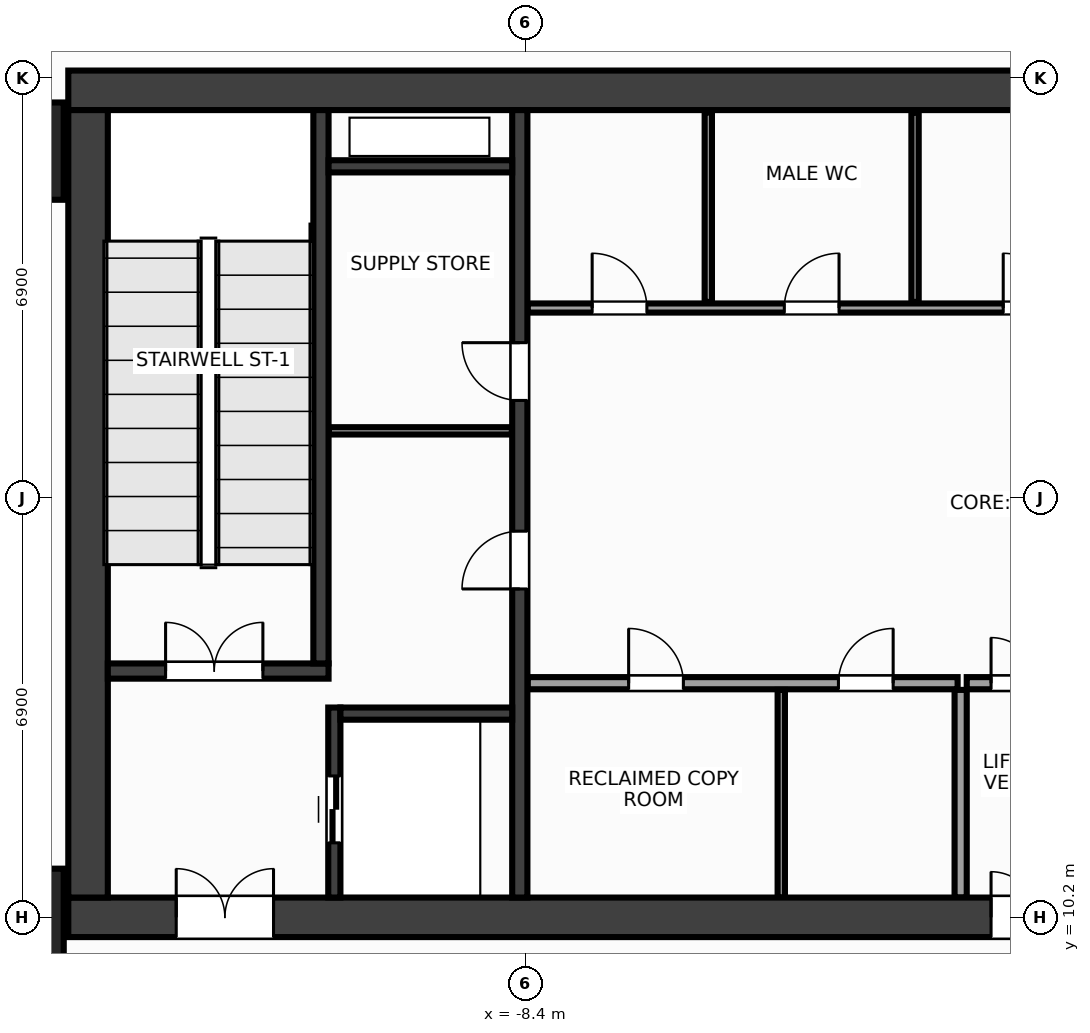
"""IFC4 building model, lengths in metres.
Left out: names, types, materials, properties, quantities, classifications, styles, units other than length and angle.
Written with IfcOpenShell. Run it as: python <this file> out.ifc"""

import sys

from ifc_helpers import new_model, si_unit, direction, frame, frame_2d, origin, origin_2d, place, context, subcontext, project, spatial, rectangle, extrude, source, transform, mapped, element, fill, save


model = new_model("IFC4")
c1 = context("Model", 3, precision=1e-05, world=origin(), true_north=direction((0.0, 1.0)))
c2 = subcontext(c1, "Body", "Model", "MODEL_VIEW")
j1 = project(units=[si_unit("LENGTHUNIT", "METRE"), si_unit("PLANEANGLEUNIT", "RADIAN")], contexts=[c1])
p1 = place(None, origin())
s1 = spatial("IfcSite", under=j1, at=p1, CompositionType="ELEMENT")
p2 = place(p1, origin())
s2 = spatial("IfcBuilding", under=s1, at=p2, CompositionType="ELEMENT")
p3 = place(p2, frame((0.0, 0.0, 124.4)))
s3 = spatial("IfcBuildingStorey", under=s2, at=p3, CompositionType="ELEMENT", Elevation=124.4)
m1 = source(origin(), c2, "Body", "SweptSolid", [
    extrude(rectangle(XDim=31.85, YDim=0.65, at=frame_2d((15.925, 0.0))), origin(), (0.0, 0.0, 1.0), 7.2),
])
p4 = place(p3, frame((-15.925, 23.8, 0.0), z_axis=(0.0, 0.0, 1.0), x_axis=(1.0, 0.0, 0.0)))
e1 = element("IfcWall", 1, at=p4, inside=s3, PredefinedType="SHEAR", context=c2, shape_type="MappedRepresentation", body=[
    mapped(m1, transform((0.0, 0.0, 0.0), x_axis=(1.0, 0.0, 0.0), y_axis=(0.0, 1.0, 0.0), z_axis=(0.0, 0.0, 1.0), scale=1.0)),
])
p5 = place(p3, frame((-15.925, 10.2, 0.0), z_axis=(0.0, 0.0, 1.0), x_axis=(1.0, 0.0, 0.0)))
e2 = element("IfcWall", 2, at=p5, inside=s3, PredefinedType="SHEAR", context=c2, shape_type="MappedRepresentation", body=[
    mapped(m1, transform((0.0, 0.0, 0.0), x_axis=(1.0, 0.0, 0.0), y_axis=(0.0, 1.0, 0.0), z_axis=(0.0, 0.0, 1.0), scale=1.0)),
])
p6 = place(p5, frame((1.775, 0.0, 0.0)))
e3 = element("IfcOpeningElement", 3, at=p6, cuts=e2, PredefinedType="OPENING", context=c2, shape_type="SweptSolid", body=[
    extrude(rectangle(XDim=1.6, YDim=2.15, at=frame_2d((0.8, 1.075))), frame((0.0, 0.337, 0.0), z_axis=(0.0, -1.0, 0.0), x_axis=(1.0, 0.0, 0.0)), (0.0, 0.0, 1.0), 0.674),
])
p7 = place(p5, frame((28.475, 0.0, 0.0)))
e4 = element("IfcOpeningElement", 4, at=p7, cuts=e2, PredefinedType="OPENING", context=c2, shape_type="SweptSolid", body=[
    extrude(rectangle(XDim=1.6, YDim=2.15, at=frame_2d((0.8, 1.075))), frame((0.0, 0.337, 0.0), z_axis=(0.0, -1.0, 0.0), x_axis=(1.0, 0.0, 0.0)), (0.0, 0.0, 1.0), 0.674),
])
p8 = place(p5, frame((15.175, 0.0, 0.0)))
e5 = element("IfcOpeningElement", 5, at=p8, cuts=e2, PredefinedType="OPENING", context=c2, shape_type="SweptSolid", body=[
    extrude(rectangle(XDim=1.5, YDim=2.2, at=frame_2d((0.75, 1.1))), frame((0.0, 0.337, 0.0), z_axis=(0.0, -1.0, 0.0), x_axis=(1.0, 0.0, 0.0)), (0.0, 0.0, 1.0), 0.674),
])
m2 = source(origin(), c2, "Body", "SweptSolid", [
    extrude(rectangle(XDim=12.95, YDim=0.65, at=frame_2d((6.475, 0.0))), origin(), (0.0, 0.0, 1.0), 7.2),
])
p9 = place(p3, frame((-15.6, 10.525, 0.0), z_axis=(0.0, 0.0, 1.0), x_axis=(0.0, 1.0, 0.0)))
e6 = element("IfcWall", 6, at=p9, inside=s3, PredefinedType="SHEAR", context=c2, shape_type="MappedRepresentation", body=[
    mapped(m2, transform((0.0, 0.0, 0.0), x_axis=(1.0, 0.0, 0.0), y_axis=(0.0, 1.0, 0.0), z_axis=(0.0, 0.0, 1.0), scale=1.0)),
])
m3 = source(origin(), c2, "Body", "SweptSolid", [
    extrude(rectangle(XDim=12.95, YDim=0.25, at=frame_2d((6.475, 0.0))), origin(), (0.0, 0.0, 1.0), 7.2),
])
p10 = place(p3, frame((-8.5, 10.525, 0.0), z_axis=(0.0, 0.0, 1.0), x_axis=(0.0, 1.0, 0.0)))
e7 = element("IfcWall", 7, at=p10, inside=s3, PredefinedType="SHEAR", context=c2, shape_type="MappedRepresentation", body=[
    mapped(m3, transform((0.0, 0.0, 0.0), x_axis=(1.0, 0.0, 0.0), y_axis=(0.0, 1.0, 0.0), z_axis=(0.0, 0.0, 1.0), scale=1.0)),
])
p11 = place(p10, frame((5.075, 0.0, 0.0)))
e8 = element("IfcOpeningElement", 8, at=p11, cuts=e7, PredefinedType="OPENING", context=c2, shape_type="SweptSolid", body=[
    extrude(rectangle(XDim=0.95, YDim=2.15, at=frame_2d((0.475, 1.075))), frame((0.0, 0.137, 0.0), z_axis=(0.0, -1.0, 0.0), x_axis=(1.0, 0.0, 0.0)), (0.0, 0.0, 1.0), 0.274),
])
p12 = place(p10, frame((8.175, 0.0, 0.0)))
e9 = element("IfcOpeningElement", 9, at=p12, cuts=e7, PredefinedType="OPENING", context=c2, shape_type="SweptSolid", body=[
    extrude(rectangle(XDim=0.95, YDim=2.15, at=frame_2d((0.475, 1.075))), frame((0.0, 0.137, 0.0), z_axis=(0.0, -1.0, 0.0), x_axis=(1.0, 0.0, 0.0)), (0.0, 0.0, 1.0), 0.274),
])
m4 = source(origin(), c2, "Body", "SweptSolid", [
    extrude(rectangle(XDim=3.63, YDim=0.25, at=frame_2d((1.815, 0.0))), origin(), (0.0, 0.0, 1.0), 7.2),
])
p13 = place(p3, frame((-15.275, 14.25, 0.0), z_axis=(0.0, 0.0, 1.0), x_axis=(1.0, 0.0, 0.0)))
e10 = element("IfcWall", 10, at=p13, inside=s3, PredefinedType="SHEAR", context=c2, shape_type="MappedRepresentation", body=[
    mapped(m4, transform((0.0, 0.0, 0.0), x_axis=(1.0, 0.0, 0.0), y_axis=(0.0, 1.0, 0.0), z_axis=(0.0, 0.0, 1.0), scale=1.0)),
])
p14 = place(p13, frame((0.95, 0.0, 0.0)))
e11 = element("IfcOpeningElement", 11, at=p14, cuts=e10, PredefinedType="OPENING", context=c2, shape_type="SweptSolid", body=[
    extrude(rectangle(XDim=1.6, YDim=2.15, at=frame_2d((0.8, 1.075))), frame((0.0, 0.137, 0.0), z_axis=(0.0, -1.0, 0.0), x_axis=(1.0, 0.0, 0.0)), (0.0, 0.0, 1.0), 0.274),
])
m5 = source(origin(), c2, "Body", "SweptSolid", [
    extrude(rectangle(XDim=9.1, YDim=0.25, at=frame_2d((4.55, 0.0))), origin(), (0.0, 0.0, 1.0), 7.2),
])
p15 = place(p3, frame((-11.77, 14.375, 0.0), z_axis=(0.0, 0.0, 1.0), x_axis=(0.0, 1.0, 0.0)))
e12 = element("IfcWall", 12, at=p15, inside=s3, PredefinedType="SHEAR", context=c2, shape_type="MappedRepresentation", body=[
    mapped(m5, transform((0.0, 0.0, 0.0), x_axis=(1.0, 0.0, 0.0), y_axis=(0.0, 1.0, 0.0), z_axis=(0.0, 0.0, 1.0), scale=1.0)),
])
m6 = source(origin(), c2, "Body", "SweptSolid", [
    extrude(rectangle(XDim=3.125, YDim=0.2, at=frame_2d((1.562, 0.0))), origin(), (0.0, 0.0, 1.0), 7.2),
])
p16 = place(p3, frame((-11.55, 10.525, 0.0), z_axis=(0.0, 0.0, 1.0), x_axis=(0.0, 1.0, 0.0)))
e13 = element("IfcWall", 13, at=p16, inside=s3, PredefinedType="SHEAR", context=c2, shape_type="MappedRepresentation", body=[
    mapped(m6, transform((0.0, 0.0, 0.0), x_axis=(1.0, 0.0, 0.0), y_axis=(0.0, 1.0, 0.0), z_axis=(0.0, 0.0, 1.0), scale=1.0)),
])
p17 = place(p16, frame((0.9, 0.0, 0.0)))
e14 = element("IfcOpeningElement", 14, at=p17, cuts=e13, PredefinedType="OPENING", context=c2, shape_type="SweptSolid", body=[
    extrude(rectangle(XDim=1.1, YDim=2.15, at=frame_2d((0.55, 1.075))), frame((0.0, 0.112, 0.0), z_axis=(0.0, -1.0, 0.0), x_axis=(1.0, 0.0, 0.0)), (0.0, 0.0, 1.0), 0.224),
])
m7 = source(origin(), c2, "Body", "SweptSolid", [
    extrude(rectangle(XDim=2.825, YDim=0.2, at=frame_2d((1.413, 0.0))), origin(), (0.0, 0.0, 1.0), 7.2),
])
p18 = place(p3, frame((-11.45, 13.55, 0.0), z_axis=(0.0, 0.0, 1.0), x_axis=(1.0, 0.0, 0.0)))
e15 = element("IfcWall", 15, at=p18, inside=s3, PredefinedType="SHEAR", context=c2, shape_type="MappedRepresentation", body=[
    mapped(m7, transform((0.0, 0.0, 0.0), x_axis=(1.0, 0.0, 0.0), y_axis=(0.0, 1.0, 0.0), z_axis=(0.0, 0.0, 1.0), scale=1.0)),
])
m8 = source(origin(), c2, "Body", "SweptSolid", [
    extrude(rectangle(XDim=3.02, YDim=0.2, at=frame_2d((1.51, 0.0))), origin(), (0.0, 0.0, 1.0), 7.2),
])
p19 = place(p3, frame((-11.645, 22.55, 0.0), z_axis=(0.0, 0.0, 1.0), x_axis=(1.0, 0.0, 0.0)))
e16 = element("IfcWall", 16, at=p19, inside=s3, PredefinedType="SHEAR", context=c2, shape_type="MappedRepresentation", body=[
    mapped(m8, transform((0.0, 0.0, 0.0), x_axis=(1.0, 0.0, 0.0), y_axis=(0.0, 1.0, 0.0), z_axis=(0.0, 0.0, 1.0), scale=1.0)),
])
m9 = source(origin(), c2, "Body", "SweptSolid", [
    extrude(rectangle(XDim=1.6, YDim=1.6, at=origin_2d()), origin(), (0.0, 0.0, 1.0), 7.2),
])
for number, where, z_axis, x_axis in (
    (17, (-16.8, 10.2, 0.0), (0.0, 0.0, 1.0), (1.0, 0.0, 0.0)),
    (18, (-16.8, 22.8, 0.0), (0.0, 0.0, 1.0), (1.0, 0.0, 0.0)),
):
    element("IfcColumn", number, at=place(p3, frame(where, z_axis=z_axis, x_axis=x_axis)), inside=s3, PredefinedType="COLUMN", context=c2, shape_type="MappedRepresentation", body=[
        mapped(m9, transform((0.0, 0.0, 0.0), x_axis=(1.0, 0.0, 0.0), y_axis=(0.0, 1.0, 0.0), z_axis=(0.0, 0.0, 1.0), scale=1.0)),
    ])
m10 = source(origin(), c2, "Body", "SweptSolid", [
    extrude(rectangle(XDim=3.01, YDim=0.12, at=frame_2d((1.505, 0.0))), origin(), (0.0, 0.0, 1.0), 6.9),
])
p20 = place(p3, frame((-11.64, 18.2, 0.0), z_axis=(0.0, 0.0, 1.0), x_axis=(1.0, 0.0, 0.0)))
e19 = element("IfcWall", 19, at=p20, inside=s3, PredefinedType="PARTITIONING", context=c2, shape_type="MappedRepresentation", body=[
    mapped(m10, transform((0.0, 0.0, 0.0), x_axis=(1.0, 0.0, 0.0), y_axis=(0.0, 1.0, 0.0), z_axis=(0.0, 0.0, 1.0), scale=1.0)),
])
m11 = source(origin(), c2, "Body", "SweptSolid", [
    extrude(rectangle(XDim=7.07, YDim=0.2, at=frame_2d((3.535, 0.0))), origin(), (0.0, 0.0, 1.0), 6.9),
])
p21 = place(p3, frame((-8.37, 14.05, 0.0), z_axis=(0.0, 0.0, 1.0), x_axis=(1.0, 0.0, 0.0)))
e20 = element("IfcWall", 20, at=p21, inside=s3, PredefinedType="PARTITIONING", context=c2, shape_type="MappedRepresentation", body=[
    mapped(m11, transform((0.0, 0.0, 0.0), x_axis=(1.0, 0.0, 0.0), y_axis=(0.0, 1.0, 0.0), z_axis=(0.0, 0.0, 1.0), scale=1.0)),
])
p22 = place(p21, frame((1.66, 0.0, 0.0)))
e21 = element("IfcOpeningElement", 21, at=p22, cuts=e20, PredefinedType="OPENING", context=c2, shape_type="SweptSolid", body=[
    extrude(rectangle(XDim=0.9, YDim=2.15, at=frame_2d((0.45, 1.075))), frame((0.0, 0.112, 0.0), z_axis=(0.0, -1.0, 0.0), x_axis=(1.0, 0.0, 0.0)), (0.0, 0.0, 1.0), 0.224),
])
p23 = place(p21, frame((5.11, 0.0, 0.0)))
e22 = element("IfcOpeningElement", 22, at=p23, cuts=e20, PredefinedType="OPENING", context=c2, shape_type="SweptSolid", body=[
    extrude(rectangle(XDim=0.9, YDim=2.15, at=frame_2d((0.45, 1.075))), frame((0.0, 0.112, 0.0), z_axis=(0.0, -1.0, 0.0), x_axis=(1.0, 0.0, 0.0)), (0.0, 0.0, 1.0), 0.224),
])
m12 = source(origin(), c2, "Body", "SweptSolid", [
    extrude(rectangle(XDim=3.415, YDim=0.2, at=frame_2d((1.708, 0.0))), origin(), (0.0, 0.0, 1.0), 6.9),
])
p24 = place(p3, frame((-1.25, 10.525, 0.0), z_axis=(0.0, 0.0, 1.0), x_axis=(0.0, 1.0, 0.0)))
e23 = element("IfcWall", 23, at=p24, inside=s3, PredefinedType="PARTITIONING", context=c2, shape_type="MappedRepresentation", body=[
    mapped(m12, transform((0.0, 0.0, 0.0), x_axis=(1.0, 0.0, 0.0), y_axis=(0.0, 1.0, 0.0), z_axis=(0.0, 0.0, 1.0), scale=1.0)),
])
m13 = source(origin(), c2, "Body", "SweptSolid", [
    extrude(rectangle(XDim=2.3, YDim=0.2, at=frame_2d((1.15, 0.0))), origin(), (0.0, 0.0, 1.0), 6.9),
])
p25 = place(p3, frame((-1.15, 14.05, 0.0), z_axis=(0.0, 0.0, 1.0), x_axis=(1.0, 0.0, 0.0)))
e24 = element("IfcWall", 24, at=p25, inside=s3, PredefinedType="PARTITIONING", context=c2, shape_type="MappedRepresentation", body=[
    mapped(m13, transform((0.0, 0.0, 0.0), x_axis=(1.0, 0.0, 0.0), y_axis=(0.0, 1.0, 0.0), z_axis=(0.0, 0.0, 1.0), scale=1.0)),
])
p26 = place(p25, frame((0.4, 0.0, 0.0)))
e25 = element("IfcOpeningElement", 25, at=p26, cuts=e24, PredefinedType="OPENING", context=c2, shape_type="SweptSolid", body=[
    extrude(rectangle(XDim=1.5, YDim=2.2, at=frame_2d((0.75, 1.1))), frame((0.0, 0.112, 0.0), z_axis=(0.0, -1.0, 0.0), x_axis=(1.0, 0.0, 0.0)), (0.0, 0.0, 1.0), 0.224),
])
m14 = source(origin(), c2, "Body", "SweptSolid", [
    extrude(rectangle(XDim=14.59, YDim=0.15, at=frame_2d((7.295, 0.0))), origin(), (0.0, 0.0, 1.0), 6.9),
])
p27 = place(p3, frame((-8.37, 20.22, 0.0), z_axis=(0.0, 0.0, 1.0), x_axis=(1.0, 0.0, 0.0)))
e26 = element("IfcWall", 26, at=p27, inside=s3, PredefinedType="PARTITIONING", context=c2, shape_type="MappedRepresentation", body=[
    mapped(m14, transform((0.0, 0.0, 0.0), x_axis=(1.0, 0.0, 0.0), y_axis=(0.0, 1.0, 0.0), z_axis=(0.0, 0.0, 1.0), scale=1.0)),
])
p28 = place(p27, frame((1.06, 0.0, 0.0)))
e27 = element("IfcOpeningElement", 27, at=p28, cuts=e26, PredefinedType="OPENING", context=c2, shape_type="SweptSolid", body=[
    extrude(rectangle(XDim=0.9, YDim=2.15, at=frame_2d((0.45, 1.075))), frame((0.0, 0.087, 0.0), z_axis=(0.0, -1.0, 0.0), x_axis=(1.0, 0.0, 0.0)), (0.0, 0.0, 1.0), 0.174),
])
p29 = place(p27, frame((4.22, 0.0, 0.0)))
e28 = element("IfcOpeningElement", 28, at=p29, cuts=e26, PredefinedType="OPENING", context=c2, shape_type="SweptSolid", body=[
    extrude(rectangle(XDim=0.9, YDim=2.15, at=frame_2d((0.45, 1.075))), frame((0.0, 0.087, 0.0), z_axis=(0.0, -1.0, 0.0), x_axis=(1.0, 0.0, 0.0)), (0.0, 0.0, 1.0), 0.174),
])
p30 = place(p27, frame((7.82, 0.0, 0.0)))
e29 = element("IfcOpeningElement", 29, at=p30, cuts=e26, PredefinedType="OPENING", context=c2, shape_type="SweptSolid", body=[
    extrude(rectangle(XDim=0.9, YDim=2.15, at=frame_2d((0.45, 1.075))), frame((0.0, 0.087, 0.0), z_axis=(0.0, -1.0, 0.0), x_axis=(1.0, 0.0, 0.0)), (0.0, 0.0, 1.0), 0.174),
])
p31 = place(p27, frame((11.87, 0.0, 0.0)))
e30 = element("IfcOpeningElement", 30, at=p31, cuts=e26, PredefinedType="OPENING", context=c2, shape_type="SweptSolid", body=[
    extrude(rectangle(XDim=0.9, YDim=2.15, at=frame_2d((0.45, 1.075))), frame((0.0, 0.087, 0.0), z_axis=(0.0, -1.0, 0.0), x_axis=(1.0, 0.0, 0.0)), (0.0, 0.0, 1.0), 0.174),
])
m15 = source(origin(), c2, "Body", "SweptSolid", [
    extrude(rectangle(XDim=3.415, YDim=0.12, at=frame_2d((1.708, 0.0))), origin(), (0.0, 0.0, 1.0), 6.9),
])
p32 = place(p3, frame((-4.2, 10.525, 0.0), z_axis=(0.0, 0.0, 1.0), x_axis=(0.0, 1.0, 0.0)))
e31 = element("IfcWall", 31, at=p32, inside=s3, PredefinedType="PARTITIONING", context=c2, shape_type="MappedRepresentation", body=[
    mapped(m15, transform((0.0, 0.0, 0.0), x_axis=(1.0, 0.0, 0.0), y_axis=(0.0, 1.0, 0.0), z_axis=(0.0, 0.0, 1.0), scale=1.0)),
])
m16 = source(origin(), c2, "Body", "SweptSolid", [
    extrude(rectangle(XDim=3.115, YDim=0.12, at=frame_2d((1.558, 0.0))), origin(), (0.0, 0.0, 1.0), 6.9),
])
for number, where, z_axis, x_axis in (
    (32, (-5.4, 20.32, 0.0), (0.0, 0.0, 1.0), (0.0, 1.0, 0.0)),
    (33, (-2.0, 20.32, 0.0), (0.0, 0.0, 1.0), (0.0, 1.0, 0.0)),
):
    element("IfcWall", number, at=place(p3, frame(where, z_axis=z_axis, x_axis=x_axis)), inside=s3, PredefinedType="PARTITIONING", context=c2, shape_type="MappedRepresentation", body=[
        mapped(m16, transform((0.0, 0.0, 0.0), x_axis=(1.0, 0.0, 0.0), y_axis=(0.0, 1.0, 0.0), z_axis=(0.0, 0.0, 1.0), scale=1.0)),
    ])
m17 = source(origin(), c2, "Body", "SweptSolid", [
    extrude(rectangle(XDim=1.6, YDim=2.15, at=frame_2d((0.8, 1.075))), frame((0.0, 0.025, 0.0), z_axis=(0.0, -1.0, 0.0), x_axis=(1.0, 0.0, 0.0)), (0.0, 0.0, 1.0), 0.05),
])
p33 = place(p14, origin())
e34 = element("IfcDoor", 34, at=p33, inside=s3, OperationType="DOUBLE_DOOR_SINGLE_SWING", PredefinedType="DOOR", context=c2, shape_type="MappedRepresentation", body=[
    mapped(m17, transform((0.0, 0.0, 0.0), x_axis=(1.0, 0.0, 0.0), y_axis=(0.0, 1.0, 0.0), z_axis=(0.0, 0.0, 1.0), scale=1.0)),
])
fill(e11, e34)
p34 = place(p6, origin())
e35 = element("IfcDoor", 35, at=p34, inside=s3, OperationType="DOUBLE_DOOR_SINGLE_SWING", PredefinedType="DOOR", context=c2, shape_type="MappedRepresentation", body=[
    mapped(m17, transform((0.0, 0.0, 0.0), x_axis=(1.0, 0.0, 0.0), y_axis=(0.0, 1.0, 0.0), z_axis=(0.0, 0.0, 1.0), scale=1.0)),
])
fill(e3, e35)
m18 = source(origin(), c2, "Body", "SweptSolid", [
    extrude(rectangle(XDim=1.1, YDim=2.15, at=frame_2d((0.55, 1.075))), frame((0.0, 0.025, 0.0), z_axis=(0.0, -1.0, 0.0), x_axis=(1.0, 0.0, 0.0)), (0.0, 0.0, 1.0), 0.05),
])
p35 = place(p17, origin())
e36 = element("IfcDoor", 36, at=p35, inside=s3, OperationType="DOUBLE_DOOR_SLIDING", PredefinedType="DOOR", context=c2, shape_type="MappedRepresentation", body=[
    mapped(m18, transform((0.0, 0.0, 0.0), x_axis=(1.0, 0.0, 0.0), y_axis=(0.0, 1.0, 0.0), z_axis=(0.0, 0.0, 1.0), scale=1.0)),
])
fill(e14, e36)
m19 = source(origin(), c2, "Body", "SweptSolid", [
    extrude(rectangle(XDim=0.95, YDim=2.15, at=frame_2d((0.475, 1.075))), frame((0.0, 0.025, 0.0), z_axis=(0.0, -1.0, 0.0), x_axis=(1.0, 0.0, 0.0)), (0.0, 0.0, 1.0), 0.05),
])
p36 = place(p11, origin())
e37 = element("IfcDoor", 37, at=p36, inside=s3, OperationType="SINGLE_SWING_LEFT", PredefinedType="DOOR", context=c2, shape_type="MappedRepresentation", body=[
    mapped(m19, transform((0.0, 0.0, 0.0), x_axis=(1.0, 0.0, 0.0), y_axis=(0.0, 1.0, 0.0), z_axis=(0.0, 0.0, 1.0), scale=1.0)),
])
fill(e8, e37)
p37 = place(p12, origin())
e38 = element("IfcDoor", 38, at=p37, inside=s3, OperationType="SINGLE_SWING_RIGHT", PredefinedType="DOOR", context=c2, shape_type="MappedRepresentation", body=[
    mapped(m19, transform((0.0, 0.0, 0.0), x_axis=(1.0, 0.0, 0.0), y_axis=(0.0, 1.0, 0.0), z_axis=(0.0, 0.0, 1.0), scale=1.0)),
])
fill(e9, e38)
m20 = source(origin(), c2, "Body", "SweptSolid", [
    extrude(rectangle(XDim=0.9, YDim=2.15, at=frame_2d((0.45, 1.075))), frame((0.0, 0.025, 0.0), z_axis=(0.0, -1.0, 0.0), x_axis=(1.0, 0.0, 0.0)), (0.0, 0.0, 1.0), 0.05),
])
p38 = place(p22, origin())
e39 = element("IfcDoor", 39, at=p38, inside=s3, OperationType="SINGLE_SWING_LEFT", PredefinedType="DOOR", context=c2, shape_type="MappedRepresentation", body=[
    mapped(m20, transform((0.0, 0.0, 0.0), x_axis=(1.0, 0.0, 0.0), y_axis=(0.0, 1.0, 0.0), z_axis=(0.0, 0.0, 1.0), scale=1.0)),
])
fill(e21, e39)
p39 = place(p23, origin())
e40 = element("IfcDoor", 40, at=p39, inside=s3, OperationType="SINGLE_SWING_RIGHT", PredefinedType="DOOR", context=c2, shape_type="MappedRepresentation", body=[
    mapped(m20, transform((0.0, 0.0, 0.0), x_axis=(1.0, 0.0, 0.0), y_axis=(0.0, 1.0, 0.0), z_axis=(0.0, 0.0, 1.0), scale=1.0)),
])
fill(e22, e40)
m21 = source(origin(), c2, "Body", "SweptSolid", [
    extrude(rectangle(XDim=1.5, YDim=2.2, at=frame_2d((0.75, 1.1))), frame((0.0, 0.025, 0.0), z_axis=(0.0, -1.0, 0.0), x_axis=(1.0, 0.0, 0.0)), (0.0, 0.0, 1.0), 0.05),
])
p40 = place(p26, origin())
e41 = element("IfcDoor", 41, at=p40, inside=s3, OperationType="DOUBLE_DOOR_SINGLE_SWING", PredefinedType="DOOR", context=c2, shape_type="MappedRepresentation", body=[
    mapped(m21, transform((0.0, 0.0, 0.0), x_axis=(1.0, 0.0, 0.0), y_axis=(0.0, 1.0, 0.0), z_axis=(0.0, 0.0, 1.0), scale=1.0)),
])
fill(e25, e41)
p41 = place(p8, origin())
e42 = element("IfcDoor", 42, at=p41, inside=s3, OperationType="DOUBLE_DOOR_SINGLE_SWING", PredefinedType="DOOR", context=c2, shape_type="MappedRepresentation", body=[
    mapped(m21, transform((0.0, 0.0, 0.0), x_axis=(1.0, 0.0, 0.0), y_axis=(0.0, 1.0, 0.0), z_axis=(0.0, 0.0, 1.0), scale=1.0)),
])
fill(e5, e42)
p42 = place(p28, origin())
e43 = element("IfcDoor", 43, at=p42, inside=s3, OperationType="SINGLE_SWING_LEFT", PredefinedType="DOOR", context=c2, shape_type="MappedRepresentation", body=[
    mapped(m20, transform((0.0, 0.0, 0.0), x_axis=(1.0, 0.0, 0.0), y_axis=(0.0, 1.0, 0.0), z_axis=(0.0, 0.0, 1.0), scale=1.0)),
])
fill(e27, e43)
p43 = place(p29, origin())
e44 = element("IfcDoor", 44, at=p43, inside=s3, OperationType="SINGLE_SWING_RIGHT", PredefinedType="DOOR", context=c2, shape_type="MappedRepresentation", body=[
    mapped(m20, transform((0.0, 0.0, 0.0), x_axis=(1.0, 0.0, 0.0), y_axis=(0.0, 1.0, 0.0), z_axis=(0.0, 0.0, 1.0), scale=1.0)),
])
fill(e28, e44)
p44 = place(p30, origin())
e45 = element("IfcDoor", 45, at=p44, inside=s3, OperationType="SINGLE_SWING_LEFT", PredefinedType="DOOR", context=c2, shape_type="MappedRepresentation", body=[
    mapped(m20, transform((0.0, 0.0, 0.0), x_axis=(1.0, 0.0, 0.0), y_axis=(0.0, 1.0, 0.0), z_axis=(0.0, 0.0, 1.0), scale=1.0)),
])
fill(e29, e45)
save(model, sys.argv[1])
